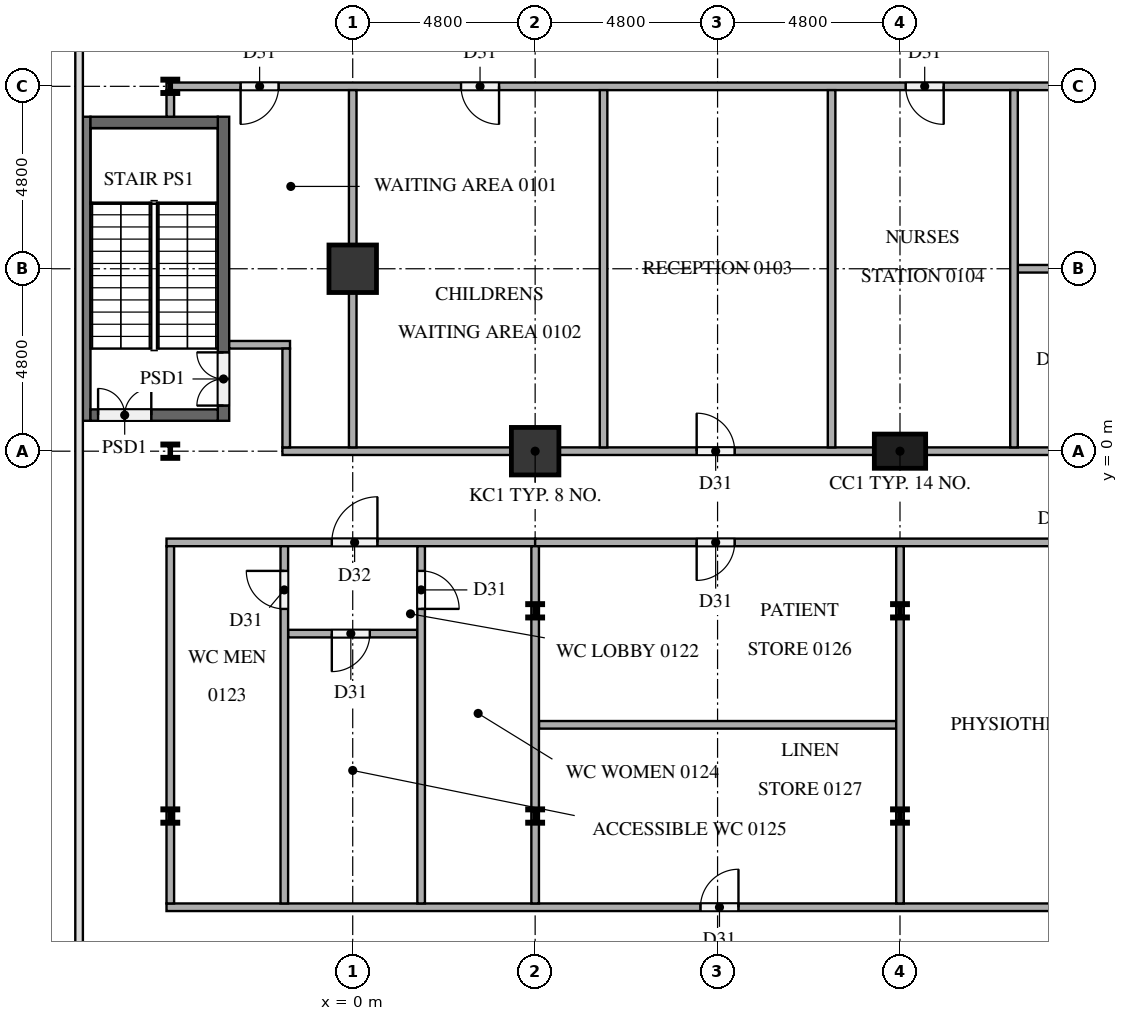
"""IFC4 building model, lengths in metres.
Left out: names, types, materials, properties, quantities, classifications, styles, units other than length and angle.
Written with IfcOpenShell. Run it as: python <this file> out.ifc"""

import sys

from ifc_helpers import new_model, si_unit, direction, frame, frame_2d, origin, origin_2d, place, context, subcontext, project, spatial, rectangle, i_section, extrude, element, fill, save


model = new_model("IFC4")
c1 = context("Model", 3, precision=1e-05, world=origin(), true_north=direction((0.0, 1.0)))
c2 = subcontext(c1, "Body", "Model", "MODEL_VIEW")
j1 = project(units=[si_unit("LENGTHUNIT", "METRE"), si_unit("PLANEANGLEUNIT", "RADIAN")], contexts=[c1])
p1 = place(None, origin())
s1 = spatial("IfcSite", under=j1, at=p1, CompositionType="ELEMENT")
p2 = place(p1, origin())
s2 = spatial("IfcBuilding", under=s1, at=p2, CompositionType="ELEMENT")
p3 = place(p2, frame((0.0, 0.0, 6.0)))
s3 = spatial("IfcBuildingStorey", under=s2, at=p3, CompositionType="ELEMENT", Elevation=6.0)
p4 = place(p3, frame((-7.05, 0.8, 0.0), z_axis=(0.0, 0.0, 1.0), x_axis=(0.0, 1.0, 0.0)))
e1 = element("IfcWall", 1, at=p4, inside=s3, PredefinedType="SOLIDWALL", context=c2, shape_type="SweptSolid", body=[
    extrude(rectangle(XDim=8.0, YDim=0.3, at=frame_2d((4.0, 0.0))), origin(), (0.0, 0.0, 1.0), 4.2),
])
p5 = place(p3, frame((-3.4, 0.8, 0.0), z_axis=(0.0, 0.0, 1.0), x_axis=(0.0, 1.0, 0.0)))
e2 = element("IfcWall", 2, at=p5, inside=s3, PredefinedType="SOLIDWALL", context=c2, shape_type="SweptSolid", body=[
    extrude(rectangle(XDim=8.0, YDim=0.3, at=frame_2d((4.0, 0.0))), origin(), (0.0, 0.0, 1.0), 4.2),
])
p6 = place(p5, frame((0.4, 0.0, 0.0)))
e3 = element("IfcOpeningElement", 3, at=p6, cuts=e2, PredefinedType="OPENING", context=c2, shape_type="SweptSolid", body=[
    extrude(rectangle(XDim=1.4, YDim=2.1, at=frame_2d((0.7, 1.05))), frame((0.0, 0.16, 0.0), z_axis=(0.0, -1.0, 0.0), x_axis=(1.0, 0.0, 0.0)), (0.0, 0.0, 1.0), 0.32),
])
p7 = place(p3, frame((-6.9, 0.95, 0.0), z_axis=(0.0, 0.0, 1.0), x_axis=(1.0, 0.0, 0.0)))
e4 = element("IfcWall", 4, at=p7, inside=s3, PredefinedType="SOLIDWALL", context=c2, shape_type="SweptSolid", body=[
    extrude(rectangle(XDim=3.35, YDim=0.3, at=frame_2d((1.675, 0.0))), origin(), (0.0, 0.0, 1.0), 4.2),
])
p8 = place(p7, frame((0.2, 0.0, 0.0)))
e5 = element("IfcOpeningElement", 5, at=p8, cuts=e4, PredefinedType="OPENING", context=c2, shape_type="SweptSolid", body=[
    extrude(rectangle(XDim=1.4, YDim=2.1, at=frame_2d((0.7, 1.05))), frame((0.0, 0.16, 0.0), z_axis=(0.0, -1.0, 0.0), x_axis=(1.0, 0.0, 0.0)), (0.0, 0.0, 1.0), 0.32),
])
p9 = place(p3, frame((-6.9, 8.65, 0.0), z_axis=(0.0, 0.0, 1.0), x_axis=(1.0, 0.0, 0.0)))
e6 = element("IfcWall", 6, at=p9, inside=s3, PredefinedType="SOLIDWALL", context=c2, shape_type="SweptSolid", body=[
    extrude(rectangle(XDim=3.35, YDim=0.3, at=frame_2d((1.675, 0.0))), origin(), (0.0, 0.0, 1.0), 4.2),
])
p10 = place(p3, frame((4.8, 0.0, 0.0), z_axis=(0.0, 0.0, 1.0), x_axis=(1.0, 0.0, 0.0)))
e7 = element("IfcColumn", 7, at=p10, inside=s3, PredefinedType="COLUMN", context=c2, shape_type="SweptSolid", body=[
    extrude(rectangle(XDim=1.25, YDim=1.25, at=origin_2d()), origin(), (0.0, 0.0, 1.0), 4.2),
])
p11 = place(p3, frame((14.4, 0.0, 0.0), z_axis=(0.0, 0.0, 1.0), x_axis=(1.0, 0.0, 0.0)))
e8 = element("IfcColumn", 8, at=p11, inside=s3, PredefinedType="COLUMN", context=c2, shape_type="SweptSolid", body=[
    extrude(rectangle(XDim=1.35, YDim=0.9, at=origin_2d()), origin(), (0.0, 0.0, 1.0), 4.2),
])
p12 = place(p3, frame((0.0, 4.8, 0.0), z_axis=(0.0, 0.0, 1.0), x_axis=(1.0, 0.0, 0.0)))
e9 = element("IfcColumn", 9, at=p12, inside=s3, PredefinedType="COLUMN", context=c2, shape_type="SweptSolid", body=[
    extrude(rectangle(XDim=1.25, YDim=1.25, at=origin_2d()), origin(), (0.0, 0.0, 1.0), 4.2),
])
for number, where, z_axis, x_axis in (
    (10, (-4.8, -9.6, 0.0), (0.0, 0.0, 1.0), (1.0, 0.0, 0.0)),
    (11, (-4.8, 0.0, 0.0), (0.0, 0.0, 1.0), (1.0, 0.0, 0.0)),
    (12, (-4.8, 9.6, 0.0), (0.0, 0.0, 1.0), (1.0, 0.0, 0.0)),
    (13, (4.8, -9.6, 0.0), (0.0, 0.0, 1.0), (1.0, 0.0, 0.0)),
    (14, (4.8, -4.2, 0.0), (0.0, 0.0, 1.0), (1.0, 0.0, 0.0)),
    (15, (14.4, -9.6, 0.0), (0.0, 0.0, 1.0), (1.0, 0.0, 0.0)),
    (16, (14.4, -4.2, 0.0), (0.0, 0.0, 1.0), (1.0, 0.0, 0.0)),
):
    element("IfcColumn", number, at=place(p3, frame(where, z_axis=z_axis, x_axis=x_axis)), inside=s3, PredefinedType="COLUMN", context=c2, shape_type="SweptSolid", body=[
        extrude(i_section(OverallWidth=0.396, OverallDepth=0.381, WebThickness=0.019, FlangeThickness=0.03, at=origin_2d()), origin(), (0.0, 0.0, 1.0), 4.2),
    ])
p13 = place(p3, frame((-4.9, -12.0, 0.0), z_axis=(0.0, 0.0, 1.0), x_axis=(1.0, 0.0, 0.0)))
e17 = element("IfcWall", 17, at=p13, inside=s3, PredefinedType="PARTITIONING", context=c2, shape_type="SweptSolid", body=[
    extrude(rectangle(XDim=34.4, YDim=0.2, at=frame_2d((17.2, 0.0))), origin(), (0.0, 0.0, 1.0), 4.2),
])
p14 = place(p13, frame((14.05, 0.0, 0.0)))
e18 = element("IfcOpeningElement", 18, at=p14, cuts=e17, PredefinedType="OPENING", context=c2, shape_type="SweptSolid", body=[
    extrude(rectangle(XDim=1.0, YDim=2.1, at=frame_2d((0.5, 1.05))), frame((0.0, 0.11, 0.0), z_axis=(0.0, -1.0, 0.0), x_axis=(1.0, 0.0, 0.0)), (0.0, 0.0, 1.0), 0.22),
])
p15 = place(p13, frame((31.15, 0.0, 0.0)))
e19 = element("IfcOpeningElement", 19, at=p15, cuts=e17, PredefinedType="OPENING", context=c2, shape_type="SweptSolid", body=[
    extrude(rectangle(XDim=1.0, YDim=2.1, at=frame_2d((0.5, 1.05))), frame((0.0, 0.11, 0.0), z_axis=(0.0, -1.0, 0.0), x_axis=(1.0, 0.0, 0.0)), (0.0, 0.0, 1.0), 0.22),
])
p16 = place(p3, frame((4.9, -7.2, 0.0), z_axis=(0.0, 0.0, 1.0), x_axis=(1.0, 0.0, 0.0)))
e20 = element("IfcWall", 20, at=p16, inside=s3, PredefinedType="PARTITIONING", context=c2, shape_type="SweptSolid", body=[
    extrude(rectangle(XDim=9.4, YDim=0.2, at=frame_2d((4.7, 0.0))), origin(), (0.0, 0.0, 1.0), 4.2),
])
p17 = place(p3, frame((1.7, -4.8, 0.0), z_axis=(0.0, 0.0, 1.0), x_axis=(-1.0, 0.0, 0.0)))
e21 = element("IfcWall", 21, at=p17, inside=s3, PredefinedType="PARTITIONING", context=c2, shape_type="SweptSolid", body=[
    extrude(rectangle(XDim=3.4, YDim=0.2, at=frame_2d((1.7, 0.0))), origin(), (0.0, 0.0, 1.0), 4.2),
])
p18 = place(p17, frame((1.25, 0.0, 0.0)))
e22 = element("IfcOpeningElement", 22, at=p18, cuts=e21, PredefinedType="OPENING", context=c2, shape_type="SweptSolid", body=[
    extrude(rectangle(XDim=1.0, YDim=2.1, at=frame_2d((0.5, 1.05))), frame((0.0, 0.11, 0.0), z_axis=(0.0, -1.0, 0.0), x_axis=(1.0, 0.0, 0.0)), (0.0, 0.0, 1.0), 0.22),
])
p19 = place(p3, frame((-4.9, -2.4, 0.0), z_axis=(0.0, 0.0, 1.0), x_axis=(1.0, 0.0, 0.0)))
e23 = element("IfcWall", 23, at=p19, inside=s3, PredefinedType="PARTITIONING", context=c2, shape_type="SweptSolid", body=[
    extrude(rectangle(XDim=9.7, YDim=0.2, at=frame_2d((4.85, 0.0))), origin(), (0.0, 0.0, 1.0), 4.2),
])
p20 = place(p19, frame((4.35, 0.0, 0.0)))
e24 = element("IfcOpeningElement", 24, at=p20, cuts=e23, PredefinedType="OPENING", context=c2, shape_type="SweptSolid", body=[
    extrude(rectangle(XDim=1.2, YDim=2.1, at=frame_2d((0.6, 1.05))), frame((0.0, 0.11, 0.0), z_axis=(0.0, -1.0, 0.0), x_axis=(1.0, 0.0, 0.0)), (0.0, 0.0, 1.0), 0.22),
])
p21 = place(p3, frame((29.5, -2.4, 0.0), z_axis=(0.0, 0.0, 1.0), x_axis=(-1.0, 0.0, 0.0)))
e25 = element("IfcWall", 25, at=p21, inside=s3, PredefinedType="PARTITIONING", context=c2, shape_type="SweptSolid", body=[
    extrude(rectangle(XDim=24.7, YDim=0.2, at=frame_2d((12.35, 0.0))), origin(), (0.0, 0.0, 1.0), 4.2),
])
p22 = place(p21, frame((19.45, 0.0, 0.0)))
e26 = element("IfcOpeningElement", 26, at=p22, cuts=e25, PredefinedType="OPENING", context=c2, shape_type="SweptSolid", body=[
    extrude(rectangle(XDim=1.0, YDim=2.1, at=frame_2d((0.5, 1.05))), frame((0.0, 0.11, 0.0), z_axis=(0.0, -1.0, 0.0), x_axis=(1.0, 0.0, 0.0)), (0.0, 0.0, 1.0), 0.22),
])
p23 = place(p21, frame((9.75, 0.0, 0.0)))
e27 = element("IfcOpeningElement", 27, at=p23, cuts=e25, PredefinedType="OPENING", context=c2, shape_type="SweptSolid", body=[
    extrude(rectangle(XDim=1.0, YDim=2.1, at=frame_2d((0.5, 1.05))), frame((0.0, 0.11, 0.0), z_axis=(0.0, -1.0, 0.0), x_axis=(1.0, 0.0, 0.0)), (0.0, 0.0, 1.0), 0.22),
])
p24 = place(p3, frame((-1.85, 0.0, 0.0), z_axis=(0.0, 0.0, 1.0), x_axis=(1.0, 0.0, 0.0)))
e28 = element("IfcWall", 28, at=p24, inside=s3, PredefinedType="PARTITIONING", context=c2, shape_type="SweptSolid", body=[
    extrude(rectangle(XDim=31.35, YDim=0.2, at=frame_2d((15.675, 0.0))), origin(), (0.0, 0.0, 1.0), 4.2),
])
p25 = place(p24, frame((10.9, 0.0, 0.0)))
e29 = element("IfcOpeningElement", 29, at=p25, cuts=e28, PredefinedType="OPENING", context=c2, shape_type="SweptSolid", body=[
    extrude(rectangle(XDim=1.0, YDim=2.1, at=frame_2d((0.5, 1.05))), frame((0.0, 0.11, 0.0), z_axis=(0.0, -1.0, 0.0), x_axis=(1.0, 0.0, 0.0)), (0.0, 0.0, 1.0), 0.22),
])
p26 = place(p24, frame((21.7, 0.0, 0.0)))
e30 = element("IfcOpeningElement", 30, at=p26, cuts=e28, PredefinedType="OPENING", context=c2, shape_type="SweptSolid", body=[
    extrude(rectangle(XDim=1.0, YDim=2.1, at=frame_2d((0.5, 1.05))), frame((0.0, 0.11, 0.0), z_axis=(0.0, -1.0, 0.0), x_axis=(1.0, 0.0, 0.0)), (0.0, 0.0, 1.0), 0.22),
])
p27 = place(p24, frame((27.8, 0.0, 0.0)))
e31 = element("IfcOpeningElement", 31, at=p27, cuts=e28, PredefinedType="OPENING", context=c2, shape_type="SweptSolid", body=[
    extrude(rectangle(XDim=1.0, YDim=2.1, at=frame_2d((0.5, 1.05))), frame((0.0, 0.11, 0.0), z_axis=(0.0, -1.0, 0.0), x_axis=(1.0, 0.0, 0.0)), (0.0, 0.0, 1.0), 0.22),
])
p28 = place(p3, frame((-3.25, 2.8, 0.0), z_axis=(0.0, 0.0, 1.0), x_axis=(1.0, 0.0, 0.0)))
e32 = element("IfcWall", 32, at=p28, inside=s3, PredefinedType="PARTITIONING", context=c2, shape_type="SweptSolid", body=[
    extrude(rectangle(XDim=1.6, YDim=0.2, at=frame_2d((0.8, 0.0))), origin(), (0.0, 0.0, 1.0), 4.2),
])
p29 = place(p3, frame((17.5, 4.8, 0.0), z_axis=(0.0, 0.0, 1.0), x_axis=(1.0, 0.0, 0.0)))
e33 = element("IfcWall", 33, at=p29, inside=s3, PredefinedType="PARTITIONING", context=c2, shape_type="SweptSolid", body=[
    extrude(rectangle(XDim=5.8, YDim=0.2, at=frame_2d((2.9, 0.0))), origin(), (0.0, 0.0, 1.0), 4.2),
])
p30 = place(p3, frame((29.5, 9.6, 0.0), z_axis=(0.0, 0.0, 1.0), x_axis=(-1.0, 0.0, 0.0)))
e34 = element("IfcWall", 34, at=p30, inside=s3, PredefinedType="PARTITIONING", context=c2, shape_type="SweptSolid", body=[
    extrude(rectangle(XDim=34.4, YDim=0.2, at=frame_2d((17.2, 0.0))), origin(), (0.0, 0.0, 1.0), 4.2),
])
p31 = place(p30, frame((31.45, 0.0, 0.0)))
e35 = element("IfcOpeningElement", 35, at=p31, cuts=e34, PredefinedType="OPENING", context=c2, shape_type="SweptSolid", body=[
    extrude(rectangle(XDim=1.0, YDim=2.1, at=frame_2d((0.5, 1.05))), frame((0.0, 0.11, 0.0), z_axis=(0.0, -1.0, 0.0), x_axis=(1.0, 0.0, 0.0)), (0.0, 0.0, 1.0), 0.22),
])
p32 = place(p30, frame((25.65, 0.0, 0.0)))
e36 = element("IfcOpeningElement", 36, at=p32, cuts=e34, PredefinedType="OPENING", context=c2, shape_type="SweptSolid", body=[
    extrude(rectangle(XDim=1.0, YDim=2.1, at=frame_2d((0.5, 1.05))), frame((0.0, 0.11, 0.0), z_axis=(0.0, -1.0, 0.0), x_axis=(1.0, 0.0, 0.0)), (0.0, 0.0, 1.0), 0.22),
])
p33 = place(p30, frame((13.95, 0.0, 0.0)))
e37 = element("IfcOpeningElement", 37, at=p33, cuts=e34, PredefinedType="OPENING", context=c2, shape_type="SweptSolid", body=[
    extrude(rectangle(XDim=1.0, YDim=2.1, at=frame_2d((0.5, 1.05))), frame((0.0, 0.11, 0.0), z_axis=(0.0, -1.0, 0.0), x_axis=(1.0, 0.0, 0.0)), (0.0, 0.0, 1.0), 0.22),
])
p34 = place(p30, frame((8.55, 0.0, 0.0)))
e38 = element("IfcOpeningElement", 38, at=p34, cuts=e34, PredefinedType="OPENING", context=c2, shape_type="SweptSolid", body=[
    extrude(rectangle(XDim=1.0, YDim=2.1, at=frame_2d((0.5, 1.05))), frame((0.0, 0.11, 0.0), z_axis=(0.0, -1.0, 0.0), x_axis=(1.0, 0.0, 0.0)), (0.0, 0.0, 1.0), 0.22),
])
p35 = place(p3, frame((-4.8, -11.9, 0.0), z_axis=(0.0, 0.0, 1.0), x_axis=(0.0, 1.0, 0.0)))
e39 = element("IfcWall", 39, at=p35, inside=s3, PredefinedType="PARTITIONING", context=c2, shape_type="SweptSolid", body=[
    extrude(rectangle(XDim=9.4, YDim=0.2, at=frame_2d((4.7, 0.0))), origin(), (0.0, 0.0, 1.0), 4.2),
])
p36 = place(p3, frame((-4.8, 8.8, 0.0), z_axis=(0.0, 0.0, 1.0), x_axis=(0.0, 1.0, 0.0)))
e40 = element("IfcWall", 40, at=p36, inside=s3, PredefinedType="PARTITIONING", context=c2, shape_type="SweptSolid", body=[
    extrude(rectangle(XDim=0.7, YDim=0.2, at=frame_2d((0.35, 0.0))), origin(), (0.0, 0.0, 1.0), 4.2),
])
p37 = place(p3, frame((-1.8, -11.9, 0.0), z_axis=(0.0, 0.0, 1.0), x_axis=(0.0, 1.0, 0.0)))
e41 = element("IfcWall", 41, at=p37, inside=s3, PredefinedType="PARTITIONING", context=c2, shape_type="SweptSolid", body=[
    extrude(rectangle(XDim=9.4, YDim=0.2, at=frame_2d((4.7, 0.0))), origin(), (0.0, 0.0, 1.0), 4.2),
])
p38 = place(p37, frame((7.75, 0.0, 0.0)))
e42 = element("IfcOpeningElement", 42, at=p38, cuts=e41, PredefinedType="OPENING", context=c2, shape_type="SweptSolid", body=[
    extrude(rectangle(XDim=1.0, YDim=2.1, at=frame_2d((0.5, 1.05))), frame((0.0, 0.11, 0.0), z_axis=(0.0, -1.0, 0.0), x_axis=(1.0, 0.0, 0.0)), (0.0, 0.0, 1.0), 0.22),
])
p39 = place(p3, frame((-1.75, 0.1, 0.0), z_axis=(0.0, 0.0, 1.0), x_axis=(0.0, 1.0, 0.0)))
e43 = element("IfcWall", 43, at=p39, inside=s3, PredefinedType="PARTITIONING", context=c2, shape_type="SweptSolid", body=[
    extrude(rectangle(XDim=2.6, YDim=0.2, at=frame_2d((1.3, 0.0))), origin(), (0.0, 0.0, 1.0), 4.2),
])
p40 = place(p3, frame((0.0, 0.1, 0.0), z_axis=(0.0, 0.0, 1.0), x_axis=(0.0, 1.0, 0.0)))
e44 = element("IfcWall", 44, at=p40, inside=s3, PredefinedType="PARTITIONING", context=c2, shape_type="SweptSolid", body=[
    extrude(rectangle(XDim=9.4, YDim=0.2, at=frame_2d((4.7, 0.0))), origin(), (0.0, 0.0, 1.0), 4.2),
])
p41 = place(p3, frame((1.8, -2.5, 0.0), z_axis=(0.0, 0.0, 1.0), x_axis=(0.0, -1.0, 0.0)))
e45 = element("IfcWall", 45, at=p41, inside=s3, PredefinedType="PARTITIONING", context=c2, shape_type="SweptSolid", body=[
    extrude(rectangle(XDim=9.4, YDim=0.2, at=frame_2d((4.7, 0.0))), origin(), (0.0, 0.0, 1.0), 4.2),
])
p42 = place(p41, frame((0.65, 0.0, 0.0)))
e46 = element("IfcOpeningElement", 46, at=p42, cuts=e45, PredefinedType="OPENING", context=c2, shape_type="SweptSolid", body=[
    extrude(rectangle(XDim=1.0, YDim=2.1, at=frame_2d((0.5, 1.05))), frame((0.0, 0.11, 0.0), z_axis=(0.0, -1.0, 0.0), x_axis=(1.0, 0.0, 0.0)), (0.0, 0.0, 1.0), 0.22),
])
for number, where, z_axis, x_axis in (
    (47, (4.8, -11.9, 0.0), (0.0, 0.0, 1.0), (0.0, 1.0, 0.0)),
    (48, (6.6, 0.1, 0.0), (0.0, 0.0, 1.0), (0.0, 1.0, 0.0)),
    (49, (12.6, 0.1, 0.0), (0.0, 0.0, 1.0), (0.0, 1.0, 0.0)),
    (50, (14.4, -11.9, 0.0), (0.0, 0.0, 1.0), (0.0, 1.0, 0.0)),
    (51, (17.4, 0.1, 0.0), (0.0, 0.0, 1.0), (0.0, 1.0, 0.0)),
):
    element("IfcWall", number, at=place(p3, frame(where, z_axis=z_axis, x_axis=x_axis)), inside=s3, PredefinedType="PARTITIONING", context=c2, shape_type="SweptSolid", body=[
        extrude(rectangle(XDim=9.4, YDim=0.2, at=frame_2d((4.7, 0.0))), origin(), (0.0, 0.0, 1.0), 4.2),
    ])
p43 = place(p6, origin())
e52 = element("IfcDoor", 52, at=p43, inside=s3, OperationType="DOUBLE_DOOR_SINGLE_SWING", PredefinedType="DOOR", context=c2, shape_type="SweptSolid", body=[
    extrude(rectangle(XDim=1.4, YDim=2.1, at=frame_2d((0.7, 1.05))), frame((0.0, 0.025, 0.0), z_axis=(0.0, -1.0, 0.0), x_axis=(1.0, 0.0, 0.0)), (0.0, 0.0, 1.0), 0.05),
])
fill(e3, e52)
p44 = place(p8, origin())
e53 = element("IfcDoor", 53, at=p44, inside=s3, OperationType="DOUBLE_DOOR_SINGLE_SWING", PredefinedType="DOOR", context=c2, shape_type="SweptSolid", body=[
    extrude(rectangle(XDim=1.4, YDim=2.1, at=frame_2d((0.7, 1.05))), frame((0.0, 0.025, 0.0), z_axis=(0.0, -1.0, 0.0), x_axis=(1.0, 0.0, 0.0)), (0.0, 0.0, 1.0), 0.05),
])
fill(e5, e53)
p45 = place(p31, origin())
e54 = element("IfcDoor", 54, at=p45, inside=s3, OperationType="SINGLE_SWING_RIGHT", PredefinedType="DOOR", context=c2, shape_type="SweptSolid", body=[
    extrude(rectangle(XDim=1.0, YDim=2.1, at=frame_2d((0.5, 1.05))), frame((0.0, 0.025, 0.0), z_axis=(0.0, -1.0, 0.0), x_axis=(1.0, 0.0, 0.0)), (0.0, 0.0, 1.0), 0.05),
])
fill(e35, e54)
p46 = place(p32, origin())
e55 = element("IfcDoor", 55, at=p46, inside=s3, OperationType="SINGLE_SWING_LEFT", PredefinedType="DOOR", context=c2, shape_type="SweptSolid", body=[
    extrude(rectangle(XDim=1.0, YDim=2.1, at=frame_2d((0.5, 1.05))), frame((0.0, 0.025, 0.0), z_axis=(0.0, -1.0, 0.0), x_axis=(1.0, 0.0, 0.0)), (0.0, 0.0, 1.0), 0.05),
])
fill(e36, e55)
p47 = place(p25, origin())
e56 = element("IfcDoor", 56, at=p47, inside=s3, OperationType="SINGLE_SWING_LEFT", PredefinedType="DOOR", context=c2, shape_type="SweptSolid", body=[
    extrude(rectangle(XDim=1.0, YDim=2.1, at=frame_2d((0.5, 1.05))), frame((0.0, 0.025, 0.0), z_axis=(0.0, -1.0, 0.0), x_axis=(1.0, 0.0, 0.0)), (0.0, 0.0, 1.0), 0.05),
])
fill(e29, e56)
p48 = place(p33, origin())
e57 = element("IfcDoor", 57, at=p48, inside=s3, OperationType="SINGLE_SWING_LEFT", PredefinedType="DOOR", context=c2, shape_type="SweptSolid", body=[
    extrude(rectangle(XDim=1.0, YDim=2.1, at=frame_2d((0.5, 1.05))), frame((0.0, 0.025, 0.0), z_axis=(0.0, -1.0, 0.0), x_axis=(1.0, 0.0, 0.0)), (0.0, 0.0, 1.0), 0.05),
])
fill(e37, e57)
p49 = place(p20, origin())
e58 = element("IfcDoor", 58, at=p49, inside=s3, OperationType="SINGLE_SWING_RIGHT", PredefinedType="DOOR", context=c2, shape_type="SweptSolid", body=[
    extrude(rectangle(XDim=1.2, YDim=2.1, at=frame_2d((0.6, 1.05))), frame((0.0, 0.025, 0.0), z_axis=(0.0, -1.0, 0.0), x_axis=(1.0, 0.0, 0.0)), (0.0, 0.0, 1.0), 0.05),
])
fill(e24, e58)
p50 = place(p38, origin())
e59 = element("IfcDoor", 59, at=p50, inside=s3, OperationType="SINGLE_SWING_RIGHT", PredefinedType="DOOR", context=c2, shape_type="SweptSolid", body=[
    extrude(rectangle(XDim=1.0, YDim=2.1, at=frame_2d((0.5, 1.05))), frame((0.0, 0.025, 0.0), z_axis=(0.0, -1.0, 0.0), x_axis=(1.0, 0.0, 0.0)), (0.0, 0.0, 1.0), 0.05),
])
fill(e42, e59)
p51 = place(p42, origin())
e60 = element("IfcDoor", 60, at=p51, inside=s3, OperationType="SINGLE_SWING_RIGHT", PredefinedType="DOOR", context=c2, shape_type="SweptSolid", body=[
    extrude(rectangle(XDim=1.0, YDim=2.1, at=frame_2d((0.5, 1.05))), frame((0.0, 0.025, 0.0), z_axis=(0.0, -1.0, 0.0), x_axis=(1.0, 0.0, 0.0)), (0.0, 0.0, 1.0), 0.05),
])
fill(e46, e60)
p52 = place(p18, origin())
e61 = element("IfcDoor", 61, at=p52, inside=s3, OperationType="SINGLE_SWING_RIGHT", PredefinedType="DOOR", context=c2, shape_type="SweptSolid", body=[
    extrude(rectangle(XDim=1.0, YDim=2.1, at=frame_2d((0.5, 1.05))), frame((0.0, 0.025, 0.0), z_axis=(0.0, -1.0, 0.0), x_axis=(1.0, 0.0, 0.0)), (0.0, 0.0, 1.0), 0.05),
])
fill(e22, e61)
p53 = place(p22, origin())
e62 = element("IfcDoor", 62, at=p53, inside=s3, OperationType="SINGLE_SWING_RIGHT", PredefinedType="DOOR", context=c2, shape_type="SweptSolid", body=[
    extrude(rectangle(XDim=1.0, YDim=2.1, at=frame_2d((0.5, 1.05))), frame((0.0, 0.025, 0.0), z_axis=(0.0, -1.0, 0.0), x_axis=(1.0, 0.0, 0.0)), (0.0, 0.0, 1.0), 0.05),
])
fill(e26, e62)
p54 = place(p14, origin())
e63 = element("IfcDoor", 63, at=p54, inside=s3, OperationType="SINGLE_SWING_RIGHT", PredefinedType="DOOR", context=c2, shape_type="SweptSolid", body=[
    extrude(rectangle(XDim=1.0, YDim=2.1, at=frame_2d((0.5, 1.05))), frame((0.0, 0.025, 0.0), z_axis=(0.0, -1.0, 0.0), x_axis=(1.0, 0.0, 0.0)), (0.0, 0.0, 1.0), 0.05),
])
fill(e18, e63)
save(model, sys.argv[1])
